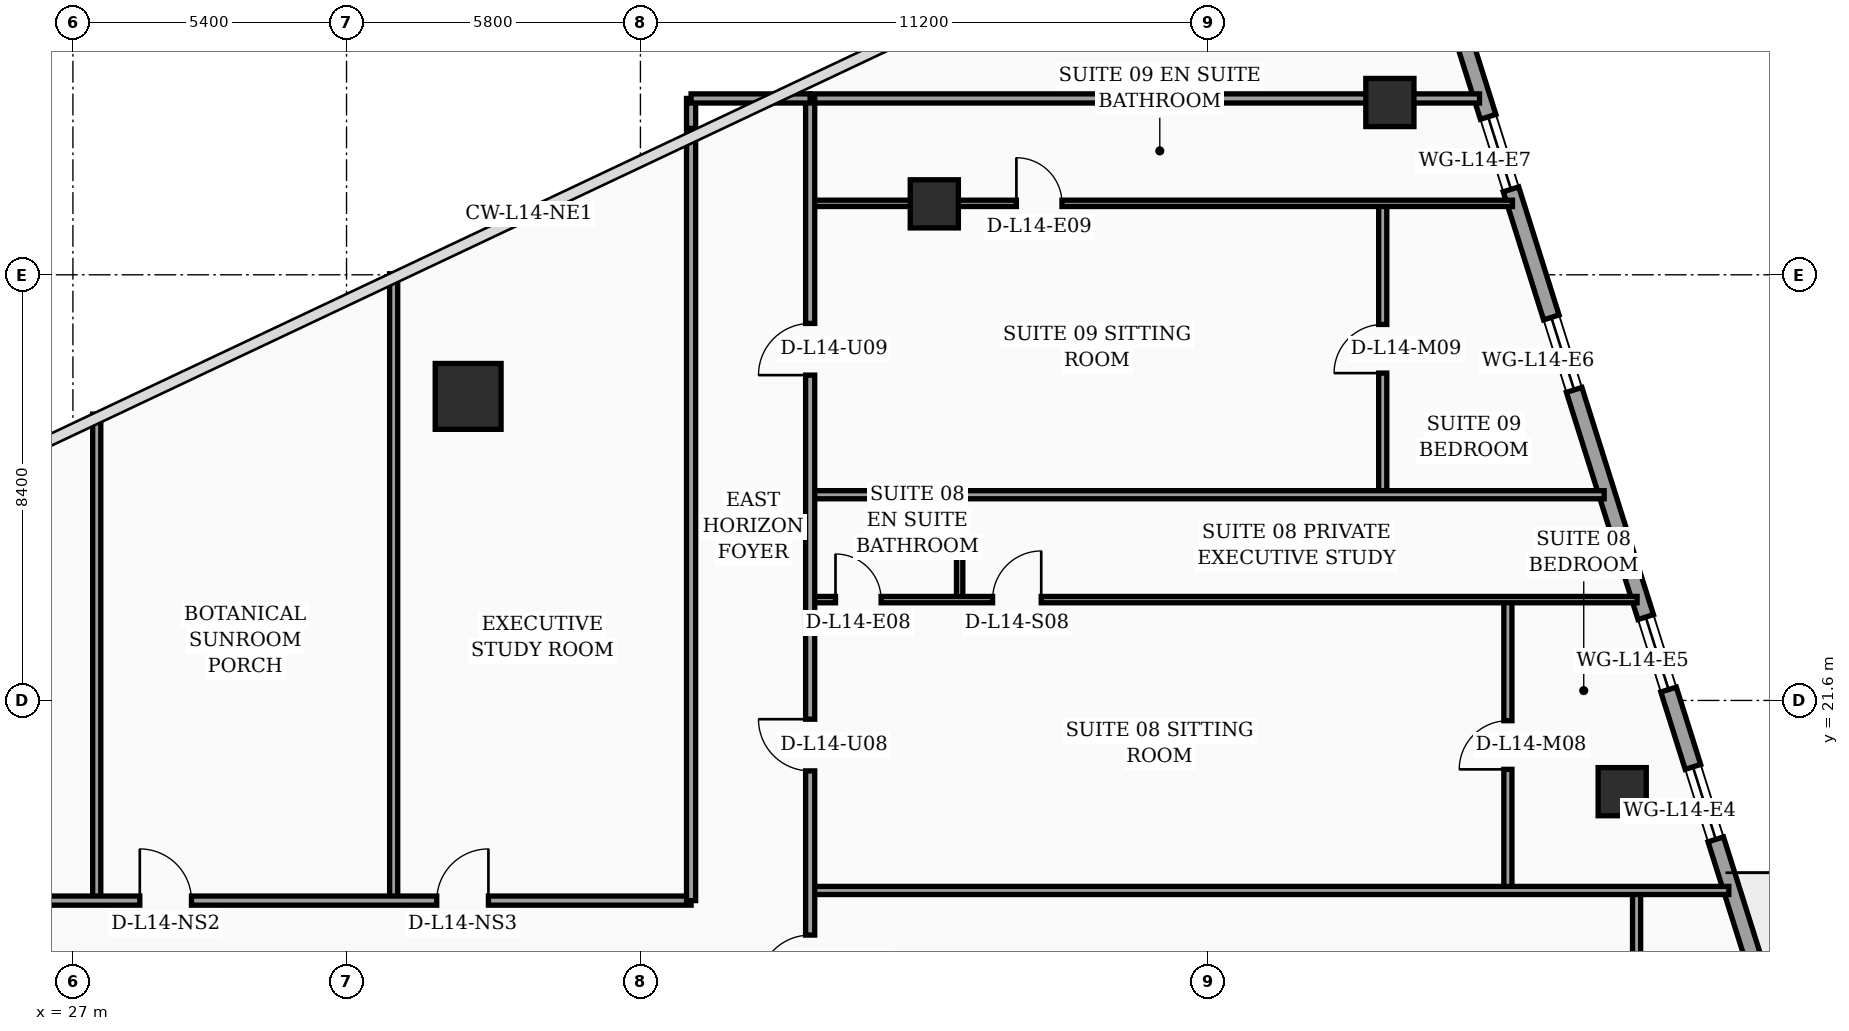
"""IFC4 building model, lengths in metres.
Left out: names, types, materials, properties, quantities, classifications, styles, units other than length and angle.
Written with IfcOpenShell. Run it as: python <this file> out.ifc"""

import sys

from ifc_helpers import new_model, si_unit, direction, frame, frame_2d, origin, origin_2d, place, context, subcontext, project, spatial, rectangle, hollow_rectangle, circle, extrude, element, fill, save


model = new_model("IFC4")
c1 = context("Model", 3, precision=1e-05, world=origin(), true_north=direction((0.0, 1.0)))
c2 = subcontext(c1, "Body", "Model", "MODEL_VIEW")
j1 = project(units=[si_unit("LENGTHUNIT", "METRE"), si_unit("PLANEANGLEUNIT", "RADIAN")], contexts=[c1])
p1 = place(None, origin())
s1 = spatial("IfcSite", under=j1, at=p1, CompositionType="ELEMENT")
p2 = place(p1, origin())
s2 = spatial("IfcBuilding", under=s1, at=p2, CompositionType="ELEMENT")
p3 = place(p2, frame((0.0, 0.0, 62.2)))
s3 = spatial("IfcBuildingStorey", under=s2, at=p3, CompositionType="ELEMENT", Elevation=62.2)
p4 = place(p3, frame((34.8, 27.6, 0.0), z_axis=(0.0, 0.0, 1.0), x_axis=(1.0, 0.0, 0.0)))
e1 = element("IfcColumn", 1, at=p4, inside=s3, PredefinedType="COLUMN", context=c2, shape_type="SweptSolid", body=[
    extrude(circle(Radius=0.65, at=origin_2d()), origin(), (0.0, 0.0, 1.0), 3.56),
])
for number, where, z_axis, x_axis in (
    (2, (44.0, 31.4, 0.0), (0.0, 0.0, 1.0), (1.0, 0.0, 0.0)),
    (3, (57.576, 19.8, 0.0), (0.0, 0.0, 1.0), (1.0, 0.0, 0.0)),
    (4, (52.991, 33.4, 0.0), (0.0, 0.0, 1.0), (1.0, 0.0, 0.0)),
):
    element("IfcColumn", number, at=place(p3, frame(where, z_axis=z_axis, x_axis=x_axis)), inside=s3, PredefinedType="COLUMN", context=c2, shape_type="SweptSolid", body=[
        extrude(hollow_rectangle(XDim=0.95, YDim=0.95, WallThickness=0.04, at=origin_2d()), origin(), (0.0, 0.0, 1.0), 3.56),
    ])
p5 = place(p3, frame((63.63, 5.505, 0.0), z_axis=(0.0, 0.0, 1.0), x_axis=(-0.300501856448, 0.953781229775, 0.0)))
e5 = element("IfcWall", 5, at=p5, inside=s3, PredefinedType="SOLIDWALL", context=c2, shape_type="SweptSolid", body=[
    extrude(rectangle(XDim=30.814, YDim=0.32, at=frame_2d((15.407, 0.0))), origin(), (0.0, 0.0, 1.0), 3.56),
])
p6 = place(p5, frame((10.199, 0.0, 0.0)))
e6 = element("IfcOpeningElement", 6, at=p6, cuts=e5, PredefinedType="OPENING", context=c2, shape_type="SweptSolid", body=[
    extrude(rectangle(XDim=1.4, YDim=2.25, at=frame_2d((0.7, 1.125))), frame((0.0, 0.17, 0.0), z_axis=(0.0, -1.0, 0.0), x_axis=(1.0, 0.0, 0.0)), (0.0, 0.0, 1.0), 0.34),
])
p7 = place(p5, frame((2.65, 0.0, 0.75)))
e7 = element("IfcOpeningElement", 7, at=p7, cuts=e5, PredefinedType="OPENING", context=c2, shape_type="SweptSolid", body=[
    extrude(rectangle(XDim=1.5, YDim=1.6, at=frame_2d((0.75, 0.8))), frame((0.0, 0.17, 0.0), z_axis=(0.0, -1.0, 0.0), x_axis=(1.0, 0.0, 0.0)), (0.0, 0.0, 1.0), 0.34),
])
p8 = place(p5, frame((4.7, 0.0, 0.75)))
e8 = element("IfcOpeningElement", 8, at=p8, cuts=e5, PredefinedType="OPENING", context=c2, shape_type="SweptSolid", body=[
    extrude(rectangle(XDim=1.5, YDim=1.6, at=frame_2d((0.75, 0.8))), frame((0.0, 0.17, 0.0), z_axis=(0.0, -1.0, 0.0), x_axis=(1.0, 0.0, 0.0)), (0.0, 0.0, 1.0), 0.34),
])
p9 = place(p5, frame((7.8, 0.0, 0.75)))
e9 = element("IfcOpeningElement", 9, at=p9, cuts=e5, PredefinedType="OPENING", context=c2, shape_type="SweptSolid", body=[
    extrude(rectangle(XDim=1.5, YDim=1.6, at=frame_2d((0.75, 0.8))), frame((0.0, 0.17, 0.0), z_axis=(0.0, -1.0, 0.0), x_axis=(1.0, 0.0, 0.0)), (0.0, 0.0, 1.0), 0.34),
])
p10 = place(p5, frame((14.0, 0.0, 0.75)))
e10 = element("IfcOpeningElement", 10, at=p10, cuts=e5, PredefinedType="OPENING", context=c2, shape_type="SweptSolid", body=[
    extrude(rectangle(XDim=1.5, YDim=1.6, at=frame_2d((0.75, 0.8))), frame((0.0, 0.17, 0.0), z_axis=(0.0, -1.0, 0.0), x_axis=(1.0, 0.0, 0.0)), (0.0, 0.0, 1.0), 0.34),
])
p11 = place(p5, frame((17.1, 0.0, 0.75)))
e11 = element("IfcOpeningElement", 11, at=p11, cuts=e5, PredefinedType="OPENING", context=c2, shape_type="SweptSolid", body=[
    extrude(rectangle(XDim=1.5, YDim=1.6, at=frame_2d((0.75, 0.8))), frame((0.0, 0.17, 0.0), z_axis=(0.0, -1.0, 0.0), x_axis=(1.0, 0.0, 0.0)), (0.0, 0.0, 1.0), 0.34),
])
p12 = place(p5, frame((23.3, 0.0, 0.75)))
e12 = element("IfcOpeningElement", 12, at=p12, cuts=e5, PredefinedType="OPENING", context=c2, shape_type="SweptSolid", body=[
    extrude(rectangle(XDim=1.5, YDim=1.6, at=frame_2d((0.75, 0.8))), frame((0.0, 0.17, 0.0), z_axis=(0.0, -1.0, 0.0), x_axis=(1.0, 0.0, 0.0)), (0.0, 0.0, 1.0), 0.34),
])
p13 = place(p5, frame((27.45, 0.0, 0.75)))
e13 = element("IfcOpeningElement", 13, at=p13, cuts=e5, PredefinedType="OPENING", context=c2, shape_type="SweptSolid", body=[
    extrude(rectangle(XDim=1.5, YDim=1.6, at=frame_2d((0.75, 0.8))), frame((0.0, 0.17, 0.0), z_axis=(0.0, -1.0, 0.0), x_axis=(1.0, 0.0, 0.0)), (0.0, 0.0, 1.0), 0.34),
])
p14 = place(p3, frame((27.47, 17.65, 0.0), z_axis=(0.0, 0.0, 1.0), x_axis=(0.0, 1.0, 0.0)))
e14 = element("IfcWall", 14, at=p14, inside=s3, PredefinedType="PARTITIONING", context=c2, shape_type="SweptSolid", body=[
    extrude(rectangle(XDim=9.6, YDim=0.16, at=frame_2d((4.8, 0.0))), origin(), (0.0, 0.0, 1.0), 2.84),
])
p15 = place(p3, frame((33.33, 17.65, 0.0), z_axis=(0.0, 0.0, 1.0), x_axis=(0.0, 1.0, 0.0)))
e15 = element("IfcWall", 15, at=p15, inside=s3, PredefinedType="PARTITIONING", context=c2, shape_type="SweptSolid", body=[
    extrude(rectangle(XDim=12.37, YDim=0.16, at=frame_2d((6.185, 0.0))), origin(), (0.0, 0.0, 1.0), 2.84),
])
p16 = place(p3, frame((21.5, 17.65, 0.0), z_axis=(0.0, 0.0, 1.0), x_axis=(1.0, 0.0, 0.0)))
e16 = element("IfcWall", 16, at=p16, inside=s3, PredefinedType="PARTITIONING", context=c2, shape_type="SweptSolid", body=[
    extrude(rectangle(XDim=17.7, YDim=0.18, at=frame_2d((8.85, 0.0))), origin(), (0.0, 0.0, 1.0), 2.84),
])
p17 = place(p16, frame((0.95, 0.0, 0.0)))
e17 = element("IfcOpeningElement", 17, at=p17, cuts=e16, PredefinedType="OPENING", context=c2, shape_type="SweptSolid", body=[
    extrude(rectangle(XDim=1.02, YDim=2.2, at=frame_2d((0.51, 1.1))), frame((0.0, 0.1, 0.0), z_axis=(0.0, -1.0, 0.0), x_axis=(1.0, 0.0, 0.0)), (0.0, 0.0, 1.0), 0.2),
])
p18 = place(p16, frame((6.82, 0.0, 0.0)))
e18 = element("IfcOpeningElement", 18, at=p18, cuts=e16, PredefinedType="OPENING", context=c2, shape_type="SweptSolid", body=[
    extrude(rectangle(XDim=1.02, YDim=2.2, at=frame_2d((0.51, 1.1))), frame((0.0, 0.1, 0.0), z_axis=(0.0, -1.0, 0.0), x_axis=(1.0, 0.0, 0.0)), (0.0, 0.0, 1.0), 0.2),
])
p19 = place(p16, frame((12.68, 0.0, 0.0)))
e19 = element("IfcOpeningElement", 19, at=p19, cuts=e16, PredefinedType="OPENING", context=c2, shape_type="SweptSolid", body=[
    extrude(rectangle(XDim=1.02, YDim=2.2, at=frame_2d((0.51, 1.1))), frame((0.0, 0.1, 0.0), z_axis=(0.0, -1.0, 0.0), x_axis=(1.0, 0.0, 0.0)), (0.0, 0.0, 1.0), 0.2),
])
p20 = place(p3, frame((39.2, 17.65, 0.0), z_axis=(0.0, 0.0, 1.0), x_axis=(0.0, 1.0, 0.0)))
e20 = element("IfcWall", 20, at=p20, inside=s3, PredefinedType="PARTITIONING", context=c2, shape_type="SweptSolid", body=[
    extrude(rectangle(XDim=15.14, YDim=0.18, at=frame_2d((7.57, 0.0))), origin(), (0.0, 0.0, 1.0), 2.84),
])
p21 = place(p3, frame((57.86, 7.45, 0.0), z_axis=(0.0, 0.0, 1.0), x_axis=(0.0, 1.0, 0.0)))
e21 = element("IfcWall", 21, at=p21, inside=s3, PredefinedType="PARTITIONING", context=c2, shape_type="SweptSolid", body=[
    extrude(rectangle(XDim=10.4, YDim=0.16, at=frame_2d((5.2, 0.0))), origin(), (0.0, 0.0, 1.0), 3.04),
])
p22 = place(p21, frame((4.72, 0.0, 0.0)))
e22 = element("IfcOpeningElement", 22, at=p22, cuts=e21, PredefinedType="OPENING", context=c2, shape_type="SweptSolid", body=[
    extrude(rectangle(XDim=0.96, YDim=2.2, at=frame_2d((0.48, 1.1))), frame((0.0, 0.09, 0.0), z_axis=(0.0, -1.0, 0.0), x_axis=(1.0, 0.0, 0.0)), (0.0, 0.0, 1.0), 0.18),
])
p23 = place(p3, frame((44.5, 23.59, 0.0), z_axis=(0.0, 0.0, 1.0), x_axis=(0.0, 1.0, 0.0)))
e23 = element("IfcWall", 23, at=p23, inside=s3, PredefinedType="PARTITIONING", context=c2, shape_type="SweptSolid", body=[
    extrude(rectangle(XDim=2.07, YDim=0.125, at=frame_2d((1.035, 0.0))), origin(), (0.0, 0.0, 1.0), 2.84),
])
p24 = place(p3, frame((55.32, 17.85, 0.0), z_axis=(0.0, 0.0, 1.0), x_axis=(0.0, 1.0, 0.0)))
e24 = element("IfcWall", 24, at=p24, inside=s3, PredefinedType="PARTITIONING", context=c2, shape_type="SweptSolid", body=[
    extrude(rectangle(XDim=5.74, YDim=0.16, at=frame_2d((2.87, 0.0))), origin(), (0.0, 0.0, 1.0), 2.84),
])
p25 = place(p24, frame((2.39, 0.0, 0.0)))
e25 = element("IfcOpeningElement", 25, at=p25, cuts=e24, PredefinedType="OPENING", context=c2, shape_type="SweptSolid", body=[
    extrude(rectangle(XDim=0.96, YDim=2.2, at=frame_2d((0.48, 1.1))), frame((0.0, 0.09, 0.0), z_axis=(0.0, -1.0, 0.0), x_axis=(1.0, 0.0, 0.0)), (0.0, 0.0, 1.0), 0.18),
])
p26 = place(p3, frame((41.55, 23.59, 0.0), z_axis=(0.0, 0.0, 1.0), x_axis=(1.0, 0.0, 0.0)))
e26 = element("IfcWall", 26, at=p26, inside=s3, PredefinedType="PARTITIONING", context=c2, shape_type="SweptSolid", body=[
    extrude(rectangle(XDim=16.32, YDim=0.125, at=frame_2d((8.16, 0.0))), origin(), (0.0, 0.0, 1.0), 2.84),
])
p27 = place(p26, frame((0.5, 0.0, 0.0)))
e27 = element("IfcOpeningElement", 27, at=p27, cuts=e26, PredefinedType="OPENING", context=c2, shape_type="SweptSolid", body=[
    extrude(rectangle(XDim=0.9, YDim=2.15, at=frame_2d((0.45, 1.075))), frame((0.0, 0.073, 0.0), z_axis=(0.0, -1.0, 0.0), x_axis=(1.0, 0.0, 0.0)), (0.0, 0.0, 1.0), 0.145),
])
p28 = place(p26, frame((3.6, 0.0, 0.0)))
e28 = element("IfcOpeningElement", 28, at=p28, cuts=e26, PredefinedType="OPENING", context=c2, shape_type="SweptSolid", body=[
    extrude(rectangle(XDim=0.96, YDim=2.2, at=frame_2d((0.48, 1.1))), frame((0.0, 0.073, 0.0), z_axis=(0.0, -1.0, 0.0), x_axis=(1.0, 0.0, 0.0)), (0.0, 0.0, 1.0), 0.145),
])
p29 = place(p3, frame((52.85, 25.66, 0.0), z_axis=(0.0, 0.0, 1.0), x_axis=(0.0, 1.0, 0.0)))
e29 = element("IfcWall", 29, at=p29, inside=s3, PredefinedType="PARTITIONING", context=c2, shape_type="SweptSolid", body=[
    extrude(rectangle(XDim=5.75, YDim=0.16, at=frame_2d((2.875, 0.0))), origin(), (0.0, 0.0, 1.0), 3.09),
])
p30 = place(p29, frame((2.4, 0.0, 0.0)))
e30 = element("IfcOpeningElement", 30, at=p30, cuts=e29, PredefinedType="OPENING", context=c2, shape_type="SweptSolid", body=[
    extrude(rectangle(XDim=0.96, YDim=2.2, at=frame_2d((0.48, 1.1))), frame((0.0, 0.09, 0.0), z_axis=(0.0, -1.0, 0.0), x_axis=(1.0, 0.0, 0.0)), (0.0, 0.0, 1.0), 0.18),
])
p31 = place(p3, frame((41.55, 31.41, 0.0), z_axis=(0.0, 0.0, 1.0), x_axis=(1.0, 0.0, 0.0)))
e31 = element("IfcWall", 31, at=p31, inside=s3, PredefinedType="PARTITIONING", context=c2, shape_type="SweptSolid", body=[
    extrude(rectangle(XDim=13.86, YDim=0.125, at=frame_2d((6.93, 0.0))), origin(), (0.0, 0.0, 1.0), 2.84),
])
p32 = place(p31, frame((4.07, 0.0, 0.0)))
e32 = element("IfcOpeningElement", 32, at=p32, cuts=e31, PredefinedType="OPENING", context=c2, shape_type="SweptSolid", body=[
    extrude(rectangle(XDim=0.9, YDim=2.15, at=frame_2d((0.45, 1.075))), frame((0.0, 0.073, 0.0), z_axis=(0.0, -1.0, 0.0), x_axis=(1.0, 0.0, 0.0)), (0.0, 0.0, 1.0), 0.145),
])
p33 = place(p3, frame((41.55, 25.66, 0.0), z_axis=(0.0, 0.0, 1.0), x_axis=(1.0, 0.0, 0.0)))
e33 = element("IfcWall", 33, at=p33, inside=s3, PredefinedType="PARTITIONING", context=c2, shape_type="SweptSolid", body=[
    extrude(rectangle(XDim=15.67, YDim=0.16, at=frame_2d((7.835, 0.0))), origin(), (0.0, 0.0, 1.0), 2.84),
])
p34 = place(p3, frame((41.55, 17.85, 0.0), z_axis=(0.0, 0.0, 1.0), x_axis=(1.0, 0.0, 0.0)))
e34 = element("IfcWall", 34, at=p34, inside=s3, PredefinedType="PARTITIONING", context=c2, shape_type="SweptSolid", body=[
    extrude(rectangle(XDim=18.13, YDim=0.16, at=frame_2d((9.065, 0.0))), origin(), (0.0, 0.0, 1.0), 2.84),
])
p35 = place(p3, frame((41.55, 33.48, 0.0), z_axis=(0.0, 0.0, 1.0), x_axis=(1.0, 0.0, 0.0)))
e35 = element("IfcWall", 35, at=p35, inside=s3, PredefinedType="PARTITIONING", context=c2, shape_type="SweptSolid", body=[
    extrude(rectangle(XDim=13.21, YDim=0.18, at=frame_2d((6.605, 0.0))), origin(), (0.0, 0.0, 1.0), 2.84),
])
p36 = place(p3, frame((41.55, 2.44, 0.0), z_axis=(0.0, 0.0, 1.0), x_axis=(0.0, 1.0, 0.0)))
e36 = element("IfcWall", 36, at=p36, inside=s3, PredefinedType="PARTITIONING", context=c2, shape_type="SweptSolid", body=[
    extrude(rectangle(XDim=31.04, YDim=0.18, at=frame_2d((15.52, 0.0))), origin(), (0.0, 0.0, 1.0), 2.84),
])
p37 = place(p36, frame((13.51, 0.0, 0.0)))
e37 = element("IfcOpeningElement", 37, at=p37, cuts=e36, PredefinedType="OPENING", context=c2, shape_type="SweptSolid", body=[
    extrude(rectangle(XDim=1.02, YDim=2.2, at=frame_2d((0.51, 1.1))), frame((0.0, 0.1, 0.0), z_axis=(0.0, -1.0, 0.0), x_axis=(1.0, 0.0, 0.0)), (0.0, 0.0, 1.0), 0.2),
])
p38 = place(p36, frame((17.77, 0.0, 0.0)))
e38 = element("IfcOpeningElement", 38, at=p38, cuts=e36, PredefinedType="OPENING", context=c2, shape_type="SweptSolid", body=[
    extrude(rectangle(XDim=1.02, YDim=2.2, at=frame_2d((0.51, 1.1))), frame((0.0, 0.1, 0.0), z_axis=(0.0, -1.0, 0.0), x_axis=(1.0, 0.0, 0.0)), (0.0, 0.0, 1.0), 0.2),
])
p39 = place(p36, frame((25.58, 0.0, 0.0)))
e39 = element("IfcOpeningElement", 39, at=p39, cuts=e36, PredefinedType="OPENING", context=c2, shape_type="SweptSolid", body=[
    extrude(rectangle(XDim=1.02, YDim=2.2, at=frame_2d((0.51, 1.1))), frame((0.0, 0.1, 0.0), z_axis=(0.0, -1.0, 0.0), x_axis=(1.0, 0.0, 0.0)), (0.0, 0.0, 1.0), 0.2),
])
p40 = place(p3, frame((39.2, 32.89, 0.0), z_axis=(0.0, 0.0, 1.0), x_axis=(0.0, 1.0, 0.0)))
e40 = element("IfcWall", 40, at=p40, inside=s3, PredefinedType="PARTITIONING", context=c2, shape_type="SweptSolid", body=[
    extrude(rectangle(XDim=0.59, YDim=0.18, at=frame_2d((0.295, 0.0))), origin(), (0.0, 0.0, 1.0), 3.56),
])
p41 = place(p3, frame((39.2, 33.48, 0.0), z_axis=(0.0, 0.0, 1.0), x_axis=(1.0, 0.0, 0.0)))
e41 = element("IfcWall", 41, at=p41, inside=s3, PredefinedType="PARTITIONING", context=c2, shape_type="SweptSolid", body=[
    extrude(rectangle(XDim=2.35, YDim=0.18, at=frame_2d((1.175, 0.0))), origin(), (0.0, 0.0, 1.0), 3.56),
])
p42 = place(p10, origin())
e42 = element("IfcWindow", 42, at=p42, inside=s3, PartitioningType="SINGLE_PANEL", PredefinedType="WINDOW", context=c2, shape_type="SweptSolid", body=[
    extrude(rectangle(XDim=1.5, YDim=1.6, at=frame_2d((0.75, 0.8))), frame((0.0, 0.03, 0.0), z_axis=(0.0, -1.0, 0.0), x_axis=(1.0, 0.0, 0.0)), (0.0, 0.0, 1.0), 0.06),
])
fill(e10, e42)
p43 = place(p11, origin())
e43 = element("IfcWindow", 43, at=p43, inside=s3, PartitioningType="SINGLE_PANEL", PredefinedType="WINDOW", context=c2, shape_type="SweptSolid", body=[
    extrude(rectangle(XDim=1.5, YDim=1.6, at=frame_2d((0.75, 0.8))), frame((0.0, 0.03, 0.0), z_axis=(0.0, -1.0, 0.0), x_axis=(1.0, 0.0, 0.0)), (0.0, 0.0, 1.0), 0.06),
])
fill(e11, e43)
p44 = place(p12, origin())
e44 = element("IfcWindow", 44, at=p44, inside=s3, PartitioningType="SINGLE_PANEL", PredefinedType="WINDOW", context=c2, shape_type="SweptSolid", body=[
    extrude(rectangle(XDim=1.5, YDim=1.6, at=frame_2d((0.75, 0.8))), frame((0.0, 0.03, 0.0), z_axis=(0.0, -1.0, 0.0), x_axis=(1.0, 0.0, 0.0)), (0.0, 0.0, 1.0), 0.06),
])
fill(e12, e44)
p45 = place(p13, origin())
e45 = element("IfcWindow", 45, at=p45, inside=s3, PartitioningType="SINGLE_PANEL", PredefinedType="WINDOW", context=c2, shape_type="SweptSolid", body=[
    extrude(rectangle(XDim=1.5, YDim=1.6, at=frame_2d((0.75, 0.8))), frame((0.0, 0.03, 0.0), z_axis=(0.0, -1.0, 0.0), x_axis=(1.0, 0.0, 0.0)), (0.0, 0.0, 1.0), 0.06),
])
fill(e13, e45)
p46 = place(p18, origin())
e46 = element("IfcDoor", 46, at=p46, inside=s3, OperationType="SINGLE_SWING_LEFT", PredefinedType="DOOR", context=c2, shape_type="SweptSolid", body=[
    extrude(rectangle(XDim=1.02, YDim=2.2, at=frame_2d((0.51, 1.1))), frame((0.0, 0.025, 0.0), z_axis=(0.0, -1.0, 0.0), x_axis=(1.0, 0.0, 0.0)), (0.0, 0.0, 1.0), 0.05),
])
fill(e18, e46)
p47 = place(p19, origin())
e47 = element("IfcDoor", 47, at=p47, inside=s3, OperationType="SINGLE_SWING_RIGHT", PredefinedType="DOOR", context=c2, shape_type="SweptSolid", body=[
    extrude(rectangle(XDim=1.02, YDim=2.2, at=frame_2d((0.51, 1.1))), frame((0.0, 0.025, 0.0), z_axis=(0.0, -1.0, 0.0), x_axis=(1.0, 0.0, 0.0)), (0.0, 0.0, 1.0), 0.05),
])
fill(e19, e47)
p48 = place(p25, origin())
e48 = element("IfcDoor", 48, at=p48, inside=s3, OperationType="SINGLE_SWING_LEFT", PredefinedType="DOOR", context=c2, shape_type="SweptSolid", body=[
    extrude(rectangle(XDim=0.96, YDim=2.2, at=frame_2d((0.48, 1.1))), frame((0.0, 0.025, 0.0), z_axis=(0.0, -1.0, 0.0), x_axis=(1.0, 0.0, 0.0)), (0.0, 0.0, 1.0), 0.05),
])
fill(e25, e48)
p49 = place(p27, origin())
e49 = element("IfcDoor", 49, at=p49, inside=s3, OperationType="SINGLE_SWING_LEFT", PredefinedType="DOOR", context=c2, shape_type="SweptSolid", body=[
    extrude(rectangle(XDim=0.9, YDim=2.15, at=frame_2d((0.45, 1.075))), frame((0.0, 0.025, 0.0), z_axis=(0.0, -1.0, 0.0), x_axis=(1.0, 0.0, 0.0)), (0.0, 0.0, 1.0), 0.05),
])
fill(e27, e49)
p50 = place(p28, origin())
e50 = element("IfcDoor", 50, at=p50, inside=s3, OperationType="SINGLE_SWING_RIGHT", PredefinedType="DOOR", context=c2, shape_type="SweptSolid", body=[
    extrude(rectangle(XDim=0.96, YDim=2.2, at=frame_2d((0.48, 1.1))), frame((0.0, 0.025, 0.0), z_axis=(0.0, -1.0, 0.0), x_axis=(1.0, 0.0, 0.0)), (0.0, 0.0, 1.0), 0.05),
])
fill(e28, e50)
p51 = place(p30, origin())
e51 = element("IfcDoor", 51, at=p51, inside=s3, OperationType="SINGLE_SWING_LEFT", PredefinedType="DOOR", context=c2, shape_type="SweptSolid", body=[
    extrude(rectangle(XDim=0.96, YDim=2.2, at=frame_2d((0.48, 1.1))), frame((0.0, 0.025, 0.0), z_axis=(0.0, -1.0, 0.0), x_axis=(1.0, 0.0, 0.0)), (0.0, 0.0, 1.0), 0.05),
])
fill(e30, e51)
p52 = place(p32, origin())
e52 = element("IfcDoor", 52, at=p52, inside=s3, OperationType="SINGLE_SWING_LEFT", PredefinedType="DOOR", context=c2, shape_type="SweptSolid", body=[
    extrude(rectangle(XDim=0.9, YDim=2.15, at=frame_2d((0.45, 1.075))), frame((0.0, 0.025, 0.0), z_axis=(0.0, -1.0, 0.0), x_axis=(1.0, 0.0, 0.0)), (0.0, 0.0, 1.0), 0.05),
])
fill(e32, e52)
p53 = place(p37, origin())
e53 = element("IfcDoor", 53, at=p53, inside=s3, OperationType="SINGLE_SWING_LEFT", PredefinedType="DOOR", context=c2, shape_type="SweptSolid", body=[
    extrude(rectangle(XDim=1.02, YDim=2.2, at=frame_2d((0.51, 1.1))), frame((0.0, 0.025, 0.0), z_axis=(0.0, -1.0, 0.0), x_axis=(1.0, 0.0, 0.0)), (0.0, 0.0, 1.0), 0.05),
])
fill(e37, e53)
p54 = place(p38, origin())
e54 = element("IfcDoor", 54, at=p54, inside=s3, OperationType="SINGLE_SWING_RIGHT", PredefinedType="DOOR", context=c2, shape_type="SweptSolid", body=[
    extrude(rectangle(XDim=1.02, YDim=2.2, at=frame_2d((0.51, 1.1))), frame((0.0, 0.025, 0.0), z_axis=(0.0, -1.0, 0.0), x_axis=(1.0, 0.0, 0.0)), (0.0, 0.0, 1.0), 0.05),
])
fill(e38, e54)
p55 = place(p39, origin())
e55 = element("IfcDoor", 55, at=p55, inside=s3, OperationType="SINGLE_SWING_LEFT", PredefinedType="DOOR", context=c2, shape_type="SweptSolid", body=[
    extrude(rectangle(XDim=1.02, YDim=2.2, at=frame_2d((0.51, 1.1))), frame((0.0, 0.025, 0.0), z_axis=(0.0, -1.0, 0.0), x_axis=(1.0, 0.0, 0.0)), (0.0, 0.0, 1.0), 0.05),
])
fill(e39, e55)
save(model, sys.argv[1])
